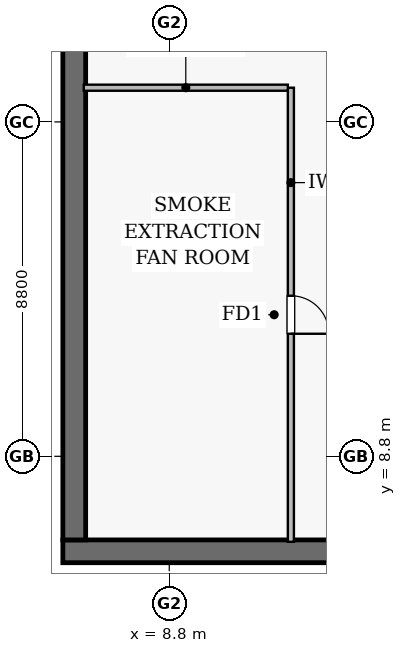
"""IFC4 building model, lengths in metres.
Left out: names, types, materials, properties, quantities, classifications, styles, units other than length and angle.
Written with IfcOpenShell. Run it as: python <this file> out.ifc"""

import sys

from ifc_helpers import new_model, si_unit, direction, frame, frame_2d, origin, place, context, subcontext, project, spatial, rectangle, extrude, element, fill, save


model = new_model("IFC4")
c1 = context("Model", 3, precision=1e-05, world=origin(), true_north=direction((0.0, 1.0)))
c2 = subcontext(c1, "Body", "Model", "MODEL_VIEW")
j1 = project(units=[si_unit("LENGTHUNIT", "METRE"), si_unit("PLANEANGLEUNIT", "RADIAN")], contexts=[c1])
p1 = place(None, origin())
s1 = spatial("IfcSite", under=j1, at=p1, CompositionType="ELEMENT")
p2 = place(p1, origin())
s2 = spatial("IfcBuilding", under=s1, at=p2, CompositionType="ELEMENT")
p3 = place(p2, frame((0.0, 0.0, -11.7)))
s3 = spatial("IfcBuildingStorey", under=s2, at=p3, CompositionType="ELEMENT", Elevation=-11.7)
p4 = place(p3, frame((6.0, 6.3, 0.0), z_axis=(0.0, 0.0, 1.0), x_axis=(1.0, 0.0, 0.0)))
e1 = element("IfcWall", 1, at=p4, inside=s3, PredefinedType="SOLIDWALL", context=c2, shape_type="SweptSolid", body=[
    extrude(rectangle(XDim=76.0, YDim=0.6, at=frame_2d((38.0, 0.0))), origin(), (0.0, 0.0, 1.0), 3.58),
])
p5 = place(p3, frame((6.3, 81.4, 0.0), z_axis=(0.0, 0.0, 1.0), x_axis=(0.0, -1.0, 0.0)))
e2 = element("IfcWall", 2, at=p5, inside=s3, PredefinedType="SOLIDWALL", context=c2, shape_type="SweptSolid", body=[
    extrude(rectangle(XDim=74.8, YDim=0.6, at=frame_2d((37.4, 0.0))), origin(), (0.0, 0.0, 1.0), 3.58),
])
p6 = place(p3, frame((12.0, 18.5, 0.0), z_axis=(0.0, 0.0, 1.0), x_axis=(0.0, -1.0, 0.0)))
e3 = element("IfcWall", 3, at=p6, inside=s3, PredefinedType="SOLIDWALL", context=c2, shape_type="SweptSolid", body=[
    extrude(rectangle(XDim=11.95, YDim=0.16, at=frame_2d((5.975, 0.0))), origin(), (0.0, 0.0, 1.0), 3.58),
])
p7 = place(p6, frame((5.475, 0.0, 0.0)))
e4 = element("IfcOpeningElement", 4, at=p7, cuts=e3, PredefinedType="OPENING", context=c2, shape_type="SweptSolid", body=[
    extrude(rectangle(XDim=1.0, YDim=2.15, at=frame_2d((0.5, 1.075))), frame((0.0, 0.09, 0.0), z_axis=(0.0, -1.0, 0.0), x_axis=(1.0, 0.0, 0.0)), (0.0, 0.0, 1.0), 0.18),
])
p8 = place(p3, frame((6.55, 18.5, 0.0), z_axis=(0.0, 0.0, 1.0), x_axis=(1.0, 0.0, 0.0)))
e5 = element("IfcWall", 5, at=p8, inside=s3, PredefinedType="SOLIDWALL", context=c2, shape_type="SweptSolid", body=[
    extrude(rectangle(XDim=5.37, YDim=0.16, at=frame_2d((2.685, 0.0))), origin(), (0.0, 0.0, 1.0), 3.58),
])
p9 = place(p7, origin())
e6 = element("IfcDoor", 6, at=p9, inside=s3, OperationType="SINGLE_SWING_RIGHT", PredefinedType="DOOR", context=c2, shape_type="SweptSolid", body=[
    extrude(rectangle(XDim=1.0, YDim=2.15, at=frame_2d((0.5, 1.075))), frame((0.0, 0.025, 0.0), z_axis=(0.0, -1.0, 0.0), x_axis=(1.0, 0.0, 0.0)), (0.0, 0.0, 1.0), 0.05),
])
fill(e4, e6)
save(model, sys.argv[1])
